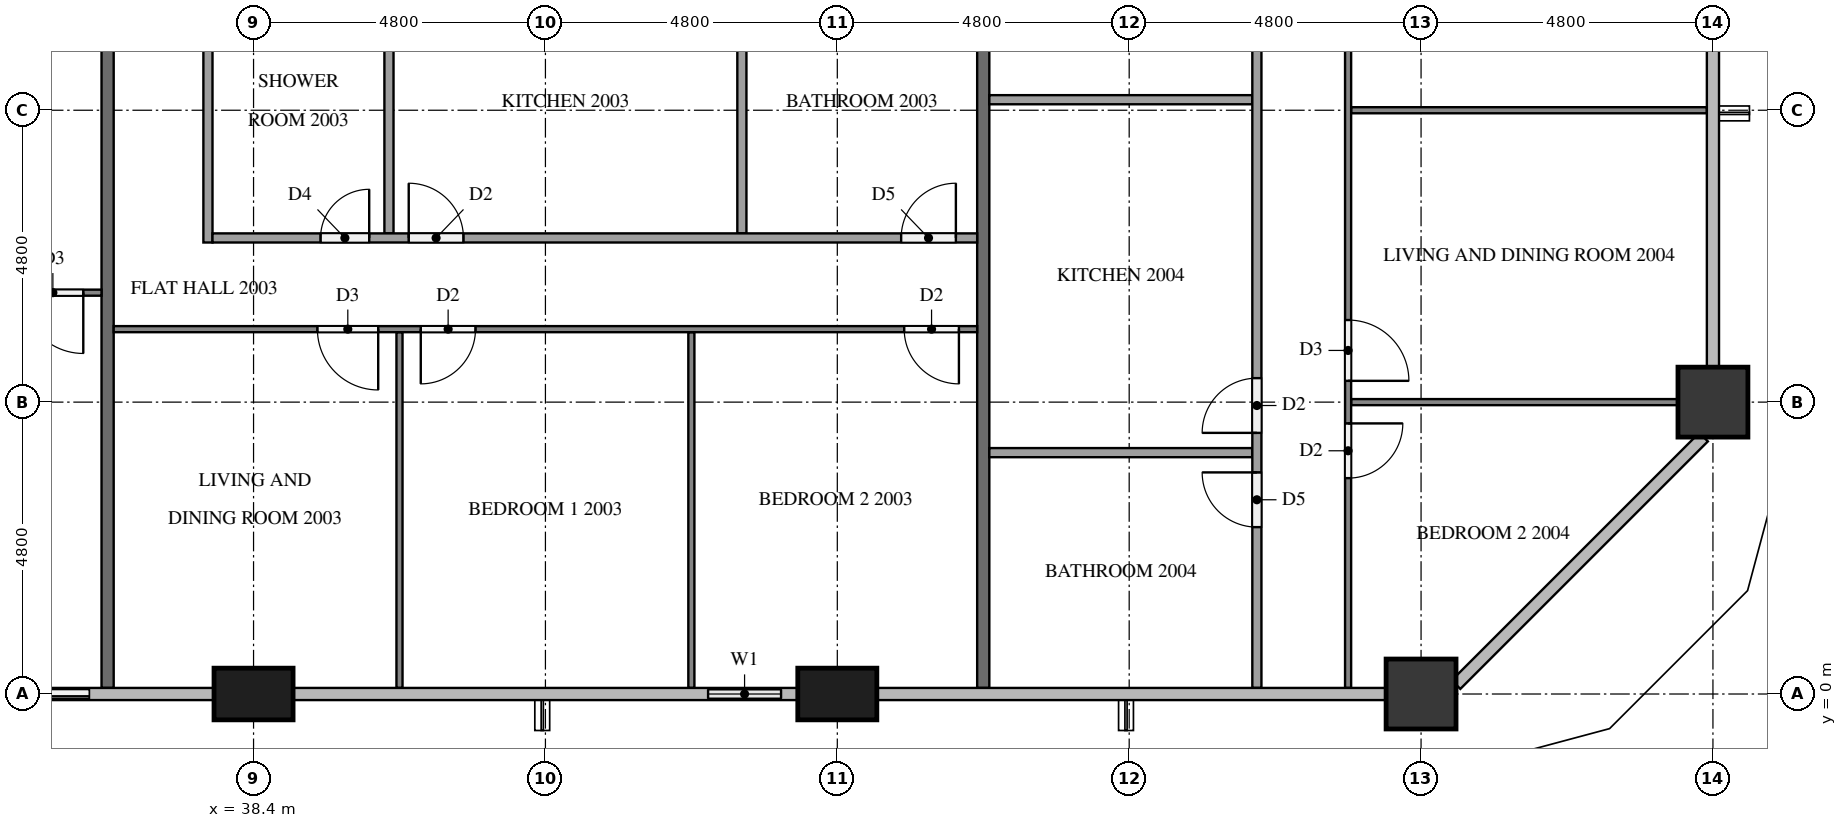
"""IFC4 building model, lengths in metres.
Left out: names, types, materials, properties, quantities, classifications, styles, units other than length and angle.
Written with IfcOpenShell. Run it as: python <this file> out.ifc"""

import sys

from ifc_helpers import new_model, si_unit, direction, frame, frame_2d, origin, origin_2d, place, context, subcontext, project, spatial, rectangle, extrude, element, fill, save


model = new_model("IFC4")
c1 = context("Model", 3, precision=1e-05, world=origin(), true_north=direction((0.0, 1.0)))
c2 = subcontext(c1, "Body", "Model", "MODEL_VIEW")
j1 = project(units=[si_unit("LENGTHUNIT", "METRE"), si_unit("PLANEANGLEUNIT", "RADIAN")], contexts=[c1])
p1 = place(None, origin())
s1 = spatial("IfcSite", under=j1, at=p1, CompositionType="ELEMENT")
p2 = place(p1, origin())
s2 = spatial("IfcBuilding", under=s1, at=p2, CompositionType="ELEMENT")
p3 = place(p2, frame((0.0, 0.0, 80.3)))
s3 = spatial("IfcBuildingStorey", under=s2, at=p3, CompositionType="ELEMENT", Elevation=80.3)
for number, where, z_axis, x_axis in (
    (1, (38.4, 0.0, 0.0), (0.0, 0.0, 1.0), (1.0, 0.0, 0.0)),
    (2, (48.0, 0.0, 0.0), (0.0, 0.0, 1.0), (1.0, 0.0, 0.0)),
):
    element("IfcColumn", number, at=place(p3, frame(where, z_axis=z_axis, x_axis=x_axis)), inside=s3, PredefinedType="COLUMN", context=c2, shape_type="SweptSolid", body=[
        extrude(rectangle(XDim=1.3, YDim=0.85, at=origin_2d()), origin(), (0.0, 0.0, 1.0), 3.1),
    ])
for number, where, z_axis, x_axis in (
    (3, (57.6, 0.0, 0.0), (0.0, 0.0, 1.0), (1.0, 0.0, 0.0)),
    (4, (62.4, 4.8, 0.0), (0.0, 0.0, 1.0), (1.0, 0.0, 0.0)),
):
    element("IfcColumn", number, at=place(p3, frame(where, z_axis=z_axis, x_axis=x_axis)), inside=s3, PredefinedType="COLUMN", context=c2, shape_type="SweptSolid", body=[
        extrude(rectangle(XDim=1.15, YDim=1.15, at=origin_2d()), origin(), (0.0, 0.0, 1.0), 3.1),
    ])
p4 = place(p3, frame((33.6, 0.0, 0.0), z_axis=(0.0, 0.0, 1.0), x_axis=(1.0, 0.0, 0.0)))
e5 = element("IfcWall", 5, at=p4, inside=s3, PredefinedType="SOLIDWALL", context=c2, shape_type="SweptSolid", body=[
    extrude(rectangle(XDim=2.4, YDim=0.15, at=frame_2d((1.2, 0.0))), origin(), (0.0, 0.0, 1.0), 3.1),
])
p5 = place(p4, frame((0.3, 0.0, 0.0)))
e6 = element("IfcOpeningElement", 6, at=p5, cuts=e5, PredefinedType="OPENING", context=c2, shape_type="SweptSolid", body=[
    extrude(rectangle(XDim=1.8, YDim=2.4, at=frame_2d((0.9, 1.2))), frame((0.0, 0.085, 0.0), z_axis=(0.0, -1.0, 0.0), x_axis=(1.0, 0.0, 0.0)), (0.0, 0.0, 1.0), 0.17),
])
p6 = place(p3, frame((45.6, 0.0, 0.0), z_axis=(0.0, 0.0, 1.0), x_axis=(1.0, 0.0, 0.0)))
e7 = element("IfcWall", 7, at=p6, inside=s3, PredefinedType="SOLIDWALL", context=c2, shape_type="SweptSolid", body=[
    extrude(rectangle(XDim=1.75, YDim=0.15, at=frame_2d((0.875, 0.0))), origin(), (0.0, 0.0, 1.0), 3.1),
])
p7 = place(p6, frame((0.275, 0.0, 0.9)))
e8 = element("IfcOpeningElement", 8, at=p7, cuts=e7, PredefinedType="OPENING", context=c2, shape_type="SweptSolid", body=[
    extrude(rectangle(XDim=1.2, YDim=1.4, at=frame_2d((0.6, 0.7))), frame((0.0, 0.085, 0.0), z_axis=(0.0, -1.0, 0.0), x_axis=(1.0, 0.0, 0.0)), (0.0, 0.0, 1.0), 0.17),
])
for number, where, z_axis, x_axis in (
    (9, (36.0, 11.9, 0.0), (0.0, 0.0, 1.0), (0.0, -1.0, 0.0)),
    (10, (50.4, 11.9, 0.0), (0.0, 0.0, 1.0), (0.0, -1.0, 0.0)),
):
    element("IfcWall", number, at=place(p3, frame(where, z_axis=z_axis, x_axis=x_axis)), inside=s3, PredefinedType="PARTITIONING", context=c2, shape_type="SweptSolid", body=[
        extrude(rectangle(XDim=11.8, YDim=0.2, at=frame_2d((5.9, 0.0))), origin(), (0.0, 0.0, 1.0), 3.1),
    ])
p8 = place(p3, frame((35.9, 6.6, 0.0), z_axis=(0.0, 0.0, 1.0), x_axis=(-1.0, 0.0, 0.0)))
e11 = element("IfcWall", 11, at=p8, inside=s3, PredefinedType="PARTITIONING", context=c2, shape_type="SweptSolid", body=[
    extrude(rectangle(XDim=16.6, YDim=0.1, at=frame_2d((8.3, 0.0))), origin(), (0.0, 0.0, 1.0), 3.1),
])
p9 = place(p8, frame((0.3, 0.0, 0.0)))
e12 = element("IfcOpeningElement", 12, at=p9, cuts=e11, PredefinedType="OPENING", context=c2, shape_type="SweptSolid", body=[
    extrude(rectangle(XDim=1.0, YDim=2.1, at=frame_2d((0.5, 1.05))), frame((0.0, 0.06, 0.0), z_axis=(0.0, -1.0, 0.0), x_axis=(1.0, 0.0, 0.0)), (0.0, 0.0, 1.0), 0.12),
])
p10 = place(p8, frame((10.65, 0.0, 0.0)))
e13 = element("IfcOpeningElement", 13, at=p10, cuts=e11, PredefinedType="OPENING", context=c2, shape_type="SweptSolid", body=[
    extrude(rectangle(XDim=0.9, YDim=2.1, at=frame_2d((0.45, 1.05))), frame((0.0, 0.06, 0.0), z_axis=(0.0, -1.0, 0.0), x_axis=(1.0, 0.0, 0.0)), (0.0, 0.0, 1.0), 0.12),
])
p11 = place(p8, frame((12.25, 0.0, 0.0)))
e14 = element("IfcOpeningElement", 14, at=p11, cuts=e11, PredefinedType="OPENING", context=c2, shape_type="SweptSolid", body=[
    extrude(rectangle(XDim=0.9, YDim=2.1, at=frame_2d((0.45, 1.05))), frame((0.0, 0.06, 0.0), z_axis=(0.0, -1.0, 0.0), x_axis=(1.0, 0.0, 0.0)), (0.0, 0.0, 1.0), 0.12),
])
for number, where, z_axis, x_axis in (
    (15, (40.8, 5.95, 0.0), (0.0, 0.0, 1.0), (0.0, -1.0, 0.0)),
    (16, (45.6, 5.95, 0.0), (0.0, 0.0, 1.0), (0.0, -1.0, 0.0)),
):
    element("IfcWall", number, at=place(p3, frame(where, z_axis=z_axis, x_axis=x_axis)), inside=s3, PredefinedType="PARTITIONING", context=c2, shape_type="SweptSolid", body=[
        extrude(rectangle(XDim=5.85, YDim=0.1, at=frame_2d((2.925, 0.0))), origin(), (0.0, 0.0, 1.0), 3.1),
    ])
p12 = place(p3, frame((50.3, 6.0, 0.0), z_axis=(0.0, 0.0, 1.0), x_axis=(-1.0, 0.0, 0.0)))
e17 = element("IfcWall", 17, at=p12, inside=s3, PredefinedType="PARTITIONING", context=c2, shape_type="SweptSolid", body=[
    extrude(rectangle(XDim=14.2, YDim=0.1, at=frame_2d((7.1, 0.0))), origin(), (0.0, 0.0, 1.0), 3.1),
])
p13 = place(p12, frame((9.85, 0.0, 0.0)))
e18 = element("IfcOpeningElement", 18, at=p13, cuts=e17, PredefinedType="OPENING", context=c2, shape_type="SweptSolid", body=[
    extrude(rectangle(XDim=1.0, YDim=2.1, at=frame_2d((0.5, 1.05))), frame((0.0, 0.06, 0.0), z_axis=(0.0, -1.0, 0.0), x_axis=(1.0, 0.0, 0.0)), (0.0, 0.0, 1.0), 0.12),
])
p14 = place(p12, frame((8.25, 0.0, 0.0)))
e19 = element("IfcOpeningElement", 19, at=p14, cuts=e17, PredefinedType="OPENING", context=c2, shape_type="SweptSolid", body=[
    extrude(rectangle(XDim=0.9, YDim=2.1, at=frame_2d((0.45, 1.05))), frame((0.0, 0.06, 0.0), z_axis=(0.0, -1.0, 0.0), x_axis=(1.0, 0.0, 0.0)), (0.0, 0.0, 1.0), 0.12),
])
p15 = place(p12, frame((0.3, 0.0, 0.0)))
e20 = element("IfcOpeningElement", 20, at=p15, cuts=e17, PredefinedType="OPENING", context=c2, shape_type="SweptSolid", body=[
    extrude(rectangle(XDim=0.9, YDim=2.1, at=frame_2d((0.45, 1.05))), frame((0.0, 0.06, 0.0), z_axis=(0.0, -1.0, 0.0), x_axis=(1.0, 0.0, 0.0)), (0.0, 0.0, 1.0), 0.12),
])
for number, where, z_axis, x_axis in (
    (21, (40.627, 11.9, 0.0), (0.0, 0.0, 1.0), (0.0, -1.0, 0.0)),
    (22, (46.431, 11.9, 0.0), (0.0, 0.0, 1.0), (0.0, -1.0, 0.0)),
):
    element("IfcWall", number, at=place(p3, frame(where, z_axis=z_axis, x_axis=x_axis)), inside=s3, PredefinedType="PARTITIONING", context=c2, shape_type="SweptSolid", body=[
        extrude(rectangle(XDim=4.325, YDim=0.15, at=frame_2d((2.163, 0.0))), origin(), (0.0, 0.0, 1.0), 3.1),
    ])
p16 = place(p3, frame((37.65, 11.9, 0.0), z_axis=(0.0, 0.0, 1.0), x_axis=(0.0, -1.0, 0.0)))
e23 = element("IfcWall", 23, at=p16, inside=s3, PredefinedType="PARTITIONING", context=c2, shape_type="SweptSolid", body=[
    extrude(rectangle(XDim=4.475, YDim=0.15, at=frame_2d((2.237, 0.0))), origin(), (0.0, 0.0, 1.0), 3.1),
])
p17 = place(p3, frame((37.725, 7.5, 0.0), z_axis=(0.0, 0.0, 1.0), x_axis=(1.0, 0.0, 0.0)))
e24 = element("IfcWall", 24, at=p17, inside=s3, PredefinedType="PARTITIONING", context=c2, shape_type="SweptSolid", body=[
    extrude(rectangle(XDim=12.575, YDim=0.15, at=frame_2d((6.288, 0.0))), origin(), (0.0, 0.0, 1.0), 3.1),
])
p18 = place(p17, frame((1.777, 0.0, 0.0)))
e25 = element("IfcOpeningElement", 25, at=p18, cuts=e24, PredefinedType="OPENING", context=c2, shape_type="SweptSolid", body=[
    extrude(rectangle(XDim=0.8, YDim=2.1, at=frame_2d((0.4, 1.05))), frame((0.0, 0.085, 0.0), z_axis=(0.0, -1.0, 0.0), x_axis=(1.0, 0.0, 0.0)), (0.0, 0.0, 1.0), 0.17),
])
p19 = place(p17, frame((3.227, 0.0, 0.0)))
e26 = element("IfcOpeningElement", 26, at=p19, cuts=e24, PredefinedType="OPENING", context=c2, shape_type="SweptSolid", body=[
    extrude(rectangle(XDim=0.9, YDim=2.1, at=frame_2d((0.45, 1.05))), frame((0.0, 0.085, 0.0), z_axis=(0.0, -1.0, 0.0), x_axis=(1.0, 0.0, 0.0)), (0.0, 0.0, 1.0), 0.17),
])
p20 = place(p17, frame((11.325, 0.0, 0.0)))
e27 = element("IfcOpeningElement", 27, at=p20, cuts=e24, PredefinedType="OPENING", context=c2, shape_type="SweptSolid", body=[
    extrude(rectangle(XDim=0.9, YDim=2.1, at=frame_2d((0.45, 1.05))), frame((0.0, 0.085, 0.0), z_axis=(0.0, -1.0, 0.0), x_axis=(1.0, 0.0, 0.0)), (0.0, 0.0, 1.0), 0.17),
])
p21 = place(p3, frame((56.45, 9.6, 0.0), z_axis=(0.0, 0.0, 1.0), x_axis=(1.0, 0.0, 0.0)))
e28 = element("IfcWall", 28, at=p21, inside=s3, PredefinedType="PARTITIONING", context=c2, shape_type="SweptSolid", body=[
    extrude(rectangle(XDim=5.85, YDim=0.1, at=frame_2d((2.925, 0.0))), origin(), (0.0, 0.0, 1.0), 3.1),
])
p22 = place(p3, frame((56.45, 4.8, 0.0), z_axis=(0.0, 0.0, 1.0), x_axis=(1.0, 0.0, 0.0)))
e29 = element("IfcWall", 29, at=p22, inside=s3, PredefinedType="PARTITIONING", context=c2, shape_type="SweptSolid", body=[
    extrude(rectangle(XDim=5.375, YDim=0.1, at=frame_2d((2.688, 0.0))), origin(), (0.0, 0.0, 1.0), 3.1),
])
p23 = place(p3, frame((56.4, 14.3, 0.0), z_axis=(0.0, 0.0, 1.0), x_axis=(0.0, -1.0, 0.0)))
e30 = element("IfcWall", 30, at=p23, inside=s3, PredefinedType="PARTITIONING", context=c2, shape_type="SweptSolid", body=[
    extrude(rectangle(XDim=14.2, YDim=0.1, at=frame_2d((7.1, 0.0))), origin(), (0.0, 0.0, 1.0), 3.1),
])
p24 = place(p23, frame((0.3, 0.0, 0.0)))
e31 = element("IfcOpeningElement", 31, at=p24, cuts=e30, PredefinedType="OPENING", context=c2, shape_type="SweptSolid", body=[
    extrude(rectangle(XDim=0.9, YDim=2.1, at=frame_2d((0.45, 1.05))), frame((0.0, 0.06, 0.0), z_axis=(0.0, -1.0, 0.0), x_axis=(1.0, 0.0, 0.0)), (0.0, 0.0, 1.0), 0.12),
])
p25 = place(p23, frame((8.15, 0.0, 0.0)))
e32 = element("IfcOpeningElement", 32, at=p25, cuts=e30, PredefinedType="OPENING", context=c2, shape_type="SweptSolid", body=[
    extrude(rectangle(XDim=1.0, YDim=2.1, at=frame_2d((0.5, 1.05))), frame((0.0, 0.06, 0.0), z_axis=(0.0, -1.0, 0.0), x_axis=(1.0, 0.0, 0.0)), (0.0, 0.0, 1.0), 0.12),
])
p26 = place(p23, frame((9.85, 0.0, 0.0)))
e33 = element("IfcOpeningElement", 33, at=p26, cuts=e30, PredefinedType="OPENING", context=c2, shape_type="SweptSolid", body=[
    extrude(rectangle(XDim=0.9, YDim=2.1, at=frame_2d((0.45, 1.05))), frame((0.0, 0.06, 0.0), z_axis=(0.0, -1.0, 0.0), x_axis=(1.0, 0.0, 0.0)), (0.0, 0.0, 1.0), 0.12),
])
for number, where, z_axis, x_axis in (
    (34, (50.5, 9.773, 0.0), (0.0, 0.0, 1.0), (1.0, 0.0, 0.0)),
    (35, (50.5, 3.969, 0.0), (0.0, 0.0, 1.0), (1.0, 0.0, 0.0)),
):
    element("IfcWall", number, at=place(p3, frame(where, z_axis=z_axis, x_axis=x_axis)), inside=s3, PredefinedType="PARTITIONING", context=c2, shape_type="SweptSolid", body=[
        extrude(rectangle(XDim=4.325, YDim=0.15, at=frame_2d((2.163, 0.0))), origin(), (0.0, 0.0, 1.0), 3.1),
    ])
p27 = place(p3, frame((54.9, 0.1, 0.0), z_axis=(0.0, 0.0, 1.0), x_axis=(0.0, 1.0, 0.0)))
e36 = element("IfcWall", 36, at=p27, inside=s3, PredefinedType="PARTITIONING", context=c2, shape_type="SweptSolid", body=[
    extrude(rectangle(XDim=12.575, YDim=0.15, at=frame_2d((6.288, 0.0))), origin(), (0.0, 0.0, 1.0), 3.1),
])
p28 = place(p27, frame((11.475, 0.0, 0.0)))
e37 = element("IfcOpeningElement", 37, at=p28, cuts=e36, PredefinedType="OPENING", context=c2, shape_type="SweptSolid", body=[
    extrude(rectangle(XDim=0.8, YDim=2.1, at=frame_2d((0.4, 1.05))), frame((0.0, 0.085, 0.0), z_axis=(0.0, -1.0, 0.0), x_axis=(1.0, 0.0, 0.0)), (0.0, 0.0, 1.0), 0.17),
])
p29 = place(p27, frame((4.194, 0.0, 0.0)))
e38 = element("IfcOpeningElement", 38, at=p29, cuts=e36, PredefinedType="OPENING", context=c2, shape_type="SweptSolid", body=[
    extrude(rectangle(XDim=0.9, YDim=2.1, at=frame_2d((0.45, 1.05))), frame((0.0, 0.085, 0.0), z_axis=(0.0, -1.0, 0.0), x_axis=(1.0, 0.0, 0.0)), (0.0, 0.0, 1.0), 0.17),
])
p30 = place(p27, frame((2.644, 0.0, 0.0)))
e39 = element("IfcOpeningElement", 39, at=p30, cuts=e36, PredefinedType="OPENING", context=c2, shape_type="SweptSolid", body=[
    extrude(rectangle(XDim=0.9, YDim=2.1, at=frame_2d((0.45, 1.05))), frame((0.0, 0.085, 0.0), z_axis=(0.0, -1.0, 0.0), x_axis=(1.0, 0.0, 0.0)), (0.0, 0.0, 1.0), 0.17),
])
p31 = place(p5, origin())
e40 = element("IfcDoor", 40, at=p31, inside=s3, OperationType="SLIDING_TO_LEFT", PredefinedType="DOOR", context=c2, shape_type="SweptSolid", body=[
    extrude(rectangle(XDim=1.8, YDim=2.4, at=frame_2d((0.9, 1.2))), frame((0.0, 0.025, 0.0), z_axis=(0.0, -1.0, 0.0), x_axis=(1.0, 0.0, 0.0)), (0.0, 0.0, 1.0), 0.05),
])
fill(e6, e40)
p32 = place(p7, origin())
e41 = element("IfcWindow", 41, at=p32, inside=s3, PartitioningType="SINGLE_PANEL", PredefinedType="WINDOW", context=c2, shape_type="SweptSolid", body=[
    extrude(rectangle(XDim=1.2, YDim=1.4, at=frame_2d((0.6, 0.7))), frame((0.0, 0.03, 0.0), z_axis=(0.0, -1.0, 0.0), x_axis=(1.0, 0.0, 0.0)), (0.0, 0.0, 1.0), 0.06),
])
fill(e8, e41)
p33 = place(p9, origin())
e42 = element("IfcDoor", 42, at=p33, inside=s3, OperationType="SINGLE_SWING_LEFT", PredefinedType="DOOR", context=c2, shape_type="SweptSolid", body=[
    extrude(rectangle(XDim=1.0, YDim=2.1, at=frame_2d((0.5, 1.05))), frame((0.0, 0.025, 0.0), z_axis=(0.0, -1.0, 0.0), x_axis=(1.0, 0.0, 0.0)), (0.0, 0.0, 1.0), 0.05),
])
fill(e12, e42)
p34 = place(p13, origin())
e43 = element("IfcDoor", 43, at=p34, inside=s3, OperationType="SINGLE_SWING_LEFT", PredefinedType="DOOR", context=c2, shape_type="SweptSolid", body=[
    extrude(rectangle(XDim=1.0, YDim=2.1, at=frame_2d((0.5, 1.05))), frame((0.0, 0.025, 0.0), z_axis=(0.0, -1.0, 0.0), x_axis=(1.0, 0.0, 0.0)), (0.0, 0.0, 1.0), 0.05),
])
fill(e18, e43)
p35 = place(p14, origin())
e44 = element("IfcDoor", 44, at=p35, inside=s3, OperationType="SINGLE_SWING_RIGHT", PredefinedType="DOOR", context=c2, shape_type="SweptSolid", body=[
    extrude(rectangle(XDim=0.9, YDim=2.1, at=frame_2d((0.45, 1.05))), frame((0.0, 0.025, 0.0), z_axis=(0.0, -1.0, 0.0), x_axis=(1.0, 0.0, 0.0)), (0.0, 0.0, 1.0), 0.05),
])
fill(e19, e44)
p36 = place(p15, origin())
e45 = element("IfcDoor", 45, at=p36, inside=s3, OperationType="SINGLE_SWING_LEFT", PredefinedType="DOOR", context=c2, shape_type="SweptSolid", body=[
    extrude(rectangle(XDim=0.9, YDim=2.1, at=frame_2d((0.45, 1.05))), frame((0.0, 0.025, 0.0), z_axis=(0.0, -1.0, 0.0), x_axis=(1.0, 0.0, 0.0)), (0.0, 0.0, 1.0), 0.05),
])
fill(e20, e45)
p37 = place(p18, origin())
e46 = element("IfcDoor", 46, at=p37, inside=s3, OperationType="SINGLE_SWING_RIGHT", PredefinedType="DOOR", context=c2, shape_type="SweptSolid", body=[
    extrude(rectangle(XDim=0.8, YDim=2.1, at=frame_2d((0.4, 1.05))), frame((0.0, 0.025, 0.0), z_axis=(0.0, -1.0, 0.0), x_axis=(1.0, 0.0, 0.0)), (0.0, 0.0, 1.0), 0.05),
])
fill(e25, e46)
p38 = place(p19, origin())
e47 = element("IfcDoor", 47, at=p38, inside=s3, OperationType="SINGLE_SWING_LEFT", PredefinedType="DOOR", context=c2, shape_type="SweptSolid", body=[
    extrude(rectangle(XDim=0.9, YDim=2.1, at=frame_2d((0.45, 1.05))), frame((0.0, 0.025, 0.0), z_axis=(0.0, -1.0, 0.0), x_axis=(1.0, 0.0, 0.0)), (0.0, 0.0, 1.0), 0.05),
])
fill(e26, e47)
p39 = place(p20, origin())
e48 = element("IfcDoor", 48, at=p39, inside=s3, OperationType="SINGLE_SWING_RIGHT", PredefinedType="DOOR", context=c2, shape_type="SweptSolid", body=[
    extrude(rectangle(XDim=0.9, YDim=2.1, at=frame_2d((0.45, 1.05))), frame((0.0, 0.025, 0.0), z_axis=(0.0, -1.0, 0.0), x_axis=(1.0, 0.0, 0.0)), (0.0, 0.0, 1.0), 0.05),
])
fill(e27, e48)
p40 = place(p25, origin())
e49 = element("IfcDoor", 49, at=p40, inside=s3, OperationType="SINGLE_SWING_RIGHT", PredefinedType="DOOR", context=c2, shape_type="SweptSolid", body=[
    extrude(rectangle(XDim=1.0, YDim=2.1, at=frame_2d((0.5, 1.05))), frame((0.0, 0.025, 0.0), z_axis=(0.0, -1.0, 0.0), x_axis=(1.0, 0.0, 0.0)), (0.0, 0.0, 1.0), 0.05),
])
fill(e32, e49)
p41 = place(p26, origin())
e50 = element("IfcDoor", 50, at=p41, inside=s3, OperationType="SINGLE_SWING_LEFT", PredefinedType="DOOR", context=c2, shape_type="SweptSolid", body=[
    extrude(rectangle(XDim=0.9, YDim=2.1, at=frame_2d((0.45, 1.05))), frame((0.0, 0.025, 0.0), z_axis=(0.0, -1.0, 0.0), x_axis=(1.0, 0.0, 0.0)), (0.0, 0.0, 1.0), 0.05),
])
fill(e33, e50)
p42 = place(p29, origin())
e51 = element("IfcDoor", 51, at=p42, inside=s3, OperationType="SINGLE_SWING_LEFT", PredefinedType="DOOR", context=c2, shape_type="SweptSolid", body=[
    extrude(rectangle(XDim=0.9, YDim=2.1, at=frame_2d((0.45, 1.05))), frame((0.0, 0.025, 0.0), z_axis=(0.0, -1.0, 0.0), x_axis=(1.0, 0.0, 0.0)), (0.0, 0.0, 1.0), 0.05),
])
fill(e38, e51)
p43 = place(p30, origin())
e52 = element("IfcDoor", 52, at=p43, inside=s3, OperationType="SINGLE_SWING_RIGHT", PredefinedType="DOOR", context=c2, shape_type="SweptSolid", body=[
    extrude(rectangle(XDim=0.9, YDim=2.1, at=frame_2d((0.45, 1.05))), frame((0.0, 0.025, 0.0), z_axis=(0.0, -1.0, 0.0), x_axis=(1.0, 0.0, 0.0)), (0.0, 0.0, 1.0), 0.05),
])
fill(e39, e52)
save(model, sys.argv[1])
